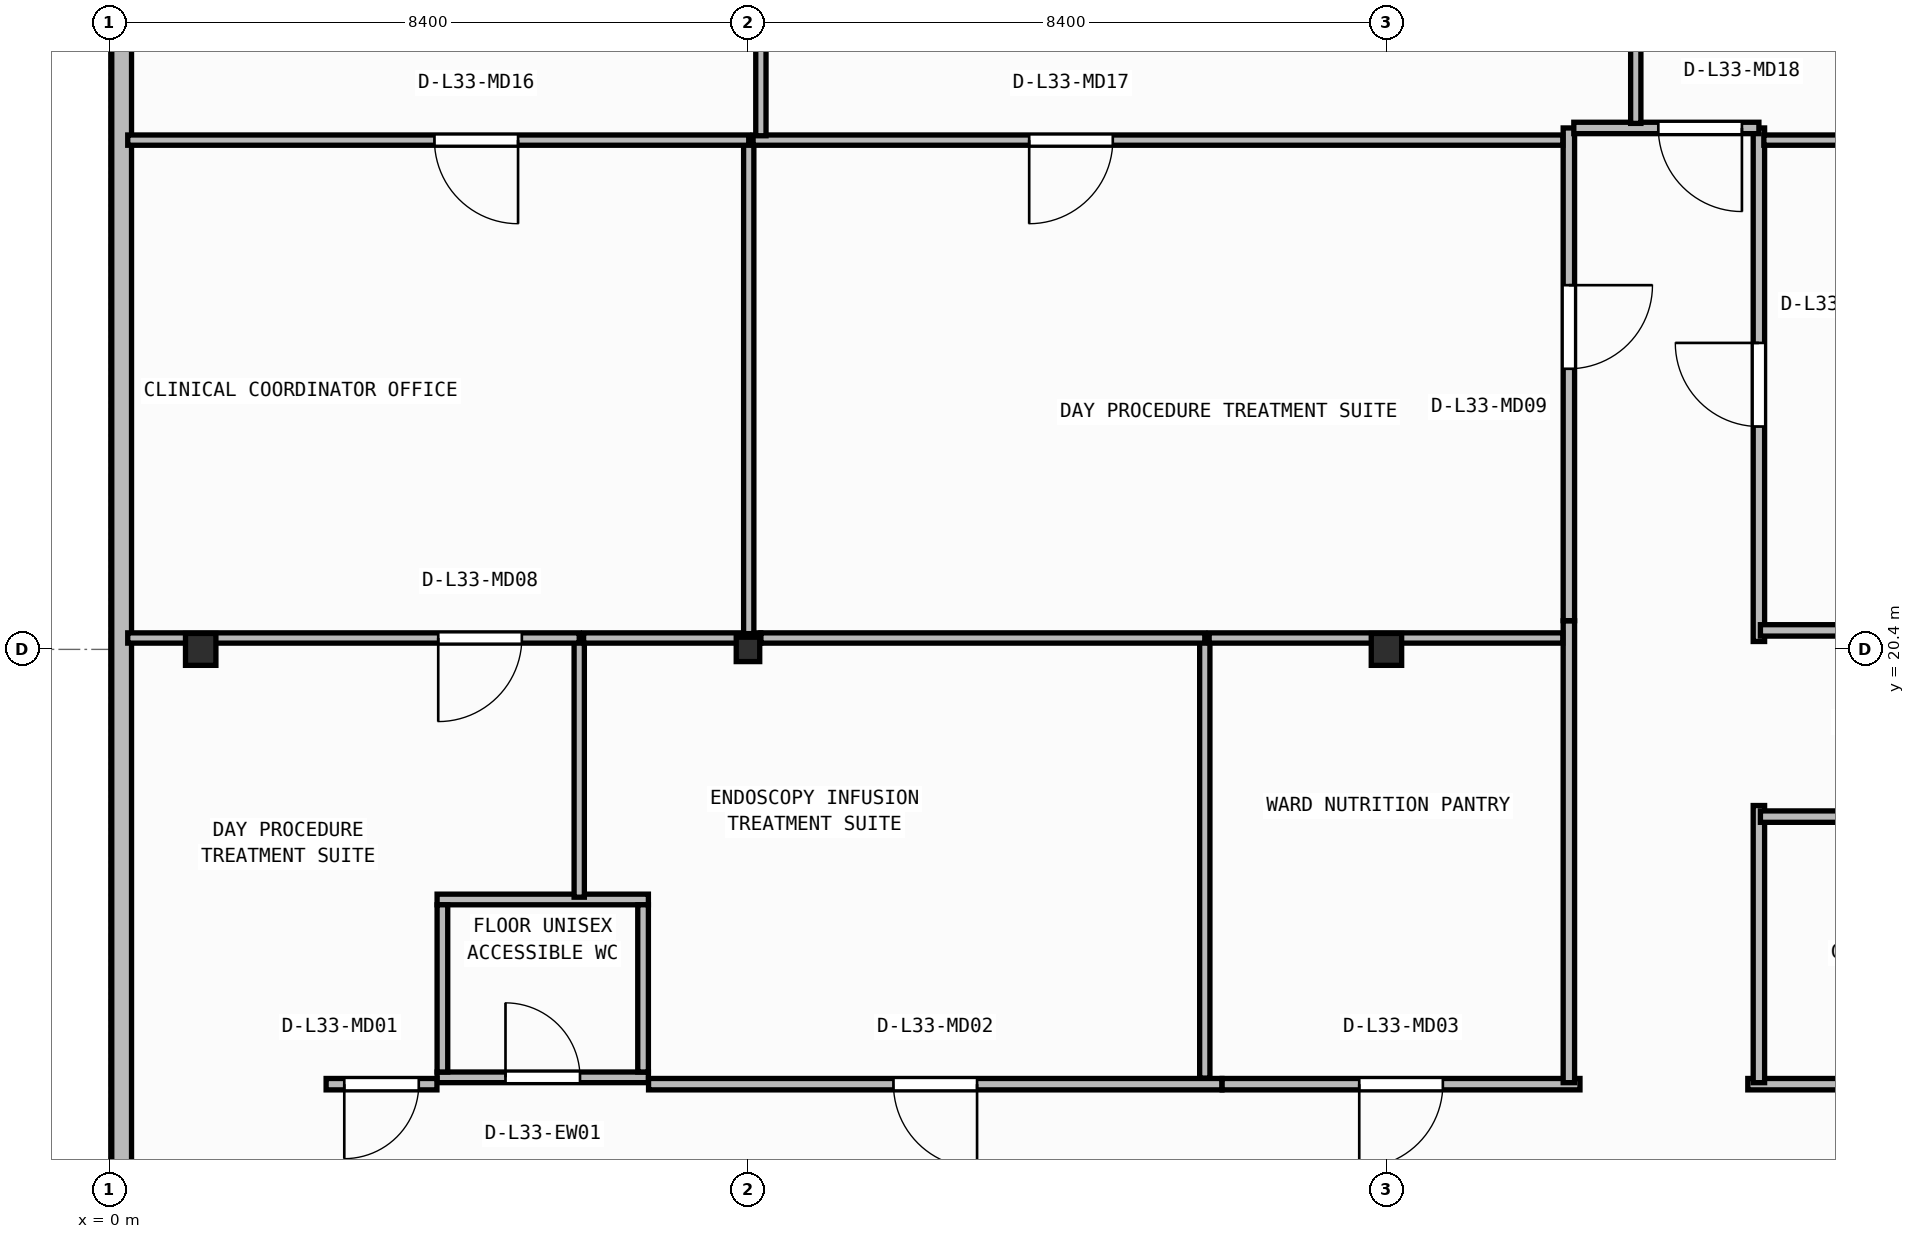
"""IFC4 building model, lengths in metres.
Left out: names, types, materials, properties, quantities, classifications, styles, units other than length and angle.
Written with IfcOpenShell. Run it as: python <this file> out.ifc"""

import sys

from ifc_helpers import new_model, si_unit, direction, frame, frame_2d, origin, origin_2d, place, context, subcontext, project, spatial, rectangle, i_section, extrude, element, fill, save


model = new_model("IFC4")
c1 = context("Model", 3, precision=1e-05, world=origin(), true_north=direction((0.0, 1.0)))
c2 = subcontext(c1, "Body", "Model", "MODEL_VIEW")
j1 = project(units=[si_unit("LENGTHUNIT", "METRE"), si_unit("PLANEANGLEUNIT", "RADIAN")], contexts=[c1])
p1 = place(None, origin())
s1 = spatial("IfcSite", under=j1, at=p1, CompositionType="ELEMENT")
p2 = place(p1, origin())
s2 = spatial("IfcBuilding", under=s1, at=p2, CompositionType="ELEMENT")
p3 = place(p2, frame((0.0, 0.0, 134.95)))
s3 = spatial("IfcBuildingStorey", under=s2, at=p3, CompositionType="ELEMENT", Elevation=134.95)
p4 = place(p3, frame((1.2, 20.4, 0.0), z_axis=(0.0, 0.0, 1.0), x_axis=(1.0, 0.0, 0.0)))
e1 = element("IfcColumn", 1, at=p4, inside=s3, PredefinedType="COLUMN", context=c2, shape_type="SweptSolid", body=[
    extrude(i_section(OverallWidth=0.4, OverallDepth=0.42, WebThickness=0.025, FlangeThickness=0.04, at=origin_2d()), origin(), (0.0, 0.0, 1.0), 3.95),
])
p5 = place(p3, frame((8.4, 20.4, 0.0), z_axis=(0.0, 0.0, 1.0), x_axis=(1.0, 0.0, 0.0)))
e2 = element("IfcColumn", 2, at=p5, inside=s3, PredefinedType="COLUMN", context=c2, shape_type="SweptSolid", body=[
    extrude(i_section(OverallWidth=0.309, OverallDepth=0.321, WebThickness=0.014, FlangeThickness=0.022, FilletRadius=0.017, at=origin_2d()), origin(), (0.0, 0.0, 1.0), 3.95),
])
p6 = place(p3, frame((16.8, 20.4, 0.0), z_axis=(0.0, 0.0, 1.0), x_axis=(1.0, 0.0, 0.0)))
e3 = element("IfcColumn", 3, at=p6, inside=s3, PredefinedType="COLUMN", context=c2, shape_type="SweptSolid", body=[
    extrude(i_section(OverallWidth=0.4, OverallDepth=0.42, WebThickness=0.025, FlangeThickness=0.04, at=origin_2d()), origin(), (0.0, 0.0, 1.0), 3.95),
])
p7 = place(p3, frame((0.16, 40.64, 0.0), z_axis=(0.0, 0.0, 1.0), x_axis=(0.0, -1.0, 0.0)))
e4 = element("IfcWall", 4, at=p7, inside=s3, PredefinedType="STANDARD", context=c2, shape_type="SweptSolid", body=[
    extrude(rectangle(XDim=37.88, YDim=0.26, at=frame_2d((18.94, 0.0))), origin(), (0.0, 0.0, 1.0), 3.71),
])
p8 = place(p7, frame((27.795, 0.0, 0.9)))
e5 = element("IfcOpeningElement", 5, at=p8, cuts=e4, PredefinedType="OPENING", context=c2, shape_type="SweptSolid", body=[
    extrude(rectangle(XDim=2.4, YDim=1.65, at=frame_2d((1.2, 0.825))), frame((0.0, 0.14, 0.0), z_axis=(0.0, -1.0, 0.0), x_axis=(1.0, 0.0, 0.0)), (0.0, 0.0, 1.0), 0.28),
])
p9 = place(p3, frame((4.31, 14.77, 0.0), z_axis=(0.0, 0.0, 1.0), x_axis=(1.0, 0.0, 0.0)))
e6 = element("IfcWall", 6, at=p9, inside=s3, PredefinedType="PARTITIONING", context=c2, shape_type="SweptSolid", body=[
    extrude(rectangle(XDim=2.78, YDim=0.14, at=frame_2d((1.39, 0.0))), origin(), (0.0, 0.0, 1.0), 3.71),
])
p10 = place(p9, frame((0.9, 0.0, 0.0)))
e7 = element("IfcOpeningElement", 7, at=p10, cuts=e6, PredefinedType="OPENING", context=c2, shape_type="SweptSolid", body=[
    extrude(rectangle(XDim=0.98, YDim=2.1, at=frame_2d((0.49, 1.05))), frame((0.0, 0.08, 0.0), z_axis=(0.0, -1.0, 0.0), x_axis=(1.0, 0.0, 0.0)), (0.0, 0.0, 1.0), 0.16),
])
p11 = place(p3, frame((4.31, 17.11, 0.0), z_axis=(0.0, 0.0, 1.0), x_axis=(1.0, 0.0, 0.0)))
e8 = element("IfcWall", 8, at=p11, inside=s3, PredefinedType="PARTITIONING", context=c2, shape_type="SweptSolid", body=[
    extrude(rectangle(XDim=2.78, YDim=0.14, at=frame_2d((1.39, 0.0))), origin(), (0.0, 0.0, 1.0), 3.71),
])
for number, where, z_axis, x_axis in (
    (9, (4.38, 14.84, 0.0), (0.0, 0.0, 1.0), (0.0, 1.0, 0.0)),
    (10, (7.02, 14.84, 0.0), (0.0, 0.0, 1.0), (0.0, 1.0, 0.0)),
):
    element("IfcWall", number, at=place(p3, frame(where, z_axis=z_axis, x_axis=x_axis)), inside=s3, PredefinedType="PARTITIONING", context=c2, shape_type="SweptSolid", body=[
        extrude(rectangle(XDim=2.2, YDim=0.14, at=frame_2d((1.1, 0.0))), origin(), (0.0, 0.0, 1.0), 3.71),
    ])
p12 = place(p3, frame((4.308, 14.68, 0.0), z_axis=(0.0, 0.0, 1.0), x_axis=(-1.0, 0.0, 0.0)))
e11 = element("IfcWall", 11, at=p12, inside=s3, PredefinedType="PARTITIONING", context=c2, shape_type="SweptSolid", body=[
    extrude(rectangle(XDim=1.458, YDim=0.15, at=frame_2d((0.729, 0.0))), origin(), (0.0, 0.0, 1.0), 3.71),
])
p13 = place(p12, frame((0.239, 0.0, 0.0)))
e12 = element("IfcOpeningElement", 12, at=p13, cuts=e11, PredefinedType="OPENING", context=c2, shape_type="SweptSolid", body=[
    extrude(rectangle(XDim=0.98, YDim=2.1, at=frame_2d((0.49, 1.05))), frame((0.0, 0.085, 0.0), z_axis=(0.0, -1.0, 0.0), x_axis=(1.0, 0.0, 0.0)), (0.0, 0.0, 1.0), 0.17),
])
p14 = place(p3, frame((14.636, 14.68, 0.0), z_axis=(0.0, 0.0, 1.0), x_axis=(-1.0, 0.0, 0.0)))
e13 = element("IfcWall", 13, at=p14, inside=s3, PredefinedType="PARTITIONING", context=c2, shape_type="SweptSolid", body=[
    extrude(rectangle(XDim=7.544, YDim=0.15, at=frame_2d((3.772, 0.0))), origin(), (0.0, 0.0, 1.0), 3.71),
])
p15 = place(p14, frame((3.222, 0.0, 0.0)))
e14 = element("IfcOpeningElement", 14, at=p15, cuts=e13, PredefinedType="OPENING", context=c2, shape_type="SweptSolid", body=[
    extrude(rectangle(XDim=1.1, YDim=2.1, at=frame_2d((0.55, 1.05))), frame((0.0, 0.085, 0.0), z_axis=(0.0, -1.0, 0.0), x_axis=(1.0, 0.0, 0.0)), (0.0, 0.0, 1.0), 0.17),
])
p16 = place(p3, frame((19.346, 14.68, 0.0), z_axis=(0.0, 0.0, 1.0), x_axis=(-1.0, 0.0, 0.0)))
e15 = element("IfcWall", 15, at=p16, inside=s3, PredefinedType="PARTITIONING", context=c2, shape_type="SweptSolid", body=[
    extrude(rectangle(XDim=4.708, YDim=0.15, at=frame_2d((2.354, 0.0))), origin(), (0.0, 0.0, 1.0), 3.71),
])
p17 = place(p16, frame((1.804, 0.0, 0.0)))
e16 = element("IfcOpeningElement", 16, at=p17, cuts=e15, PredefinedType="OPENING", context=c2, shape_type="SweptSolid", body=[
    extrude(rectangle(XDim=1.1, YDim=2.1, at=frame_2d((0.55, 1.05))), frame((0.0, 0.085, 0.0), z_axis=(0.0, -1.0, 0.0), x_axis=(1.0, 0.0, 0.0)), (0.0, 0.0, 1.0), 0.17),
])
p18 = place(p3, frame((34.196, 14.68, 0.0), z_axis=(0.0, 0.0, 1.0), x_axis=(-1.0, 0.0, 0.0)))
e17 = element("IfcWall", 17, at=p18, inside=s3, PredefinedType="PARTITIONING", context=c2, shape_type="SweptSolid", body=[
    extrude(rectangle(XDim=12.642, YDim=0.15, at=frame_2d((6.321, 0.0))), origin(), (0.0, 0.0, 1.0), 3.71),
])
p19 = place(p18, frame((5.771, 0.0, 0.0)))
e18 = element("IfcOpeningElement", 18, at=p19, cuts=e17, PredefinedType="OPENING", context=c2, shape_type="SweptSolid", body=[
    extrude(rectangle(XDim=1.1, YDim=2.1, at=frame_2d((0.55, 1.05))), frame((0.0, 0.085, 0.0), z_axis=(0.0, -1.0, 0.0), x_axis=(1.0, 0.0, 0.0)), (0.0, 0.0, 1.0), 0.17),
])
p20 = place(p3, frame((19.2, 20.776, 0.0), z_axis=(0.0, 0.0, 1.0), x_axis=(0.0, -1.0, 0.0)))
e19 = element("IfcWall", 19, at=p20, inside=s3, PredefinedType="PARTITIONING", context=c2, shape_type="SweptSolid", body=[
    extrude(rectangle(XDim=6.076, YDim=0.15, at=frame_2d((3.038, 0.0))), origin(), (0.0, 0.0, 1.0), 3.71),
])
p21 = place(p3, frame((21.7, 14.7, 0.0), z_axis=(0.0, 0.0, 1.0), x_axis=(0.0, 1.0, 0.0)))
e20 = element("IfcWall", 20, at=p21, inside=s3, PredefinedType="PARTITIONING", context=c2, shape_type="SweptSolid", body=[
    extrude(rectangle(XDim=3.646, YDim=0.15, at=frame_2d((1.823, 0.0))), origin(), (0.0, 0.0, 1.0), 3.71),
])
p22 = place(p3, frame((19.2, 27.26, 0.0), z_axis=(0.0, 0.0, 1.0), x_axis=(0.0, -1.0, 0.0)))
e21 = element("IfcWall", 21, at=p22, inside=s3, PredefinedType="PARTITIONING", context=c2, shape_type="SweptSolid", body=[
    extrude(rectangle(XDim=6.482, YDim=0.15, at=frame_2d((3.241, 0.0))), origin(), (0.0, 0.0, 1.0), 3.71),
])
p23 = place(p22, frame((2.068, 0.0, 0.0)))
e22 = element("IfcOpeningElement", 22, at=p23, cuts=e21, PredefinedType="OPENING", context=c2, shape_type="SweptSolid", body=[
    extrude(rectangle(XDim=1.1, YDim=2.1, at=frame_2d((0.55, 1.05))), frame((0.0, 0.085, 0.0), z_axis=(0.0, -1.0, 0.0), x_axis=(1.0, 0.0, 0.0)), (0.0, 0.0, 1.0), 0.17),
])
p24 = place(p3, frame((21.7, 20.504, 0.0), z_axis=(0.0, 0.0, 1.0), x_axis=(0.0, 1.0, 0.0)))
e23 = element("IfcWall", 23, at=p24, inside=s3, PredefinedType="PARTITIONING", context=c2, shape_type="SweptSolid", body=[
    extrude(rectangle(XDim=6.756, YDim=0.15, at=frame_2d((3.378, 0.0))), origin(), (0.0, 0.0, 1.0), 3.71),
])
p25 = place(p24, frame((2.828, 0.0, 0.0)))
e24 = element("IfcOpeningElement", 24, at=p25, cuts=e23, PredefinedType="OPENING", context=c2, shape_type="SweptSolid", body=[
    extrude(rectangle(XDim=1.1, YDim=2.1, at=frame_2d((0.55, 1.05))), frame((0.0, 0.085, 0.0), z_axis=(0.0, -1.0, 0.0), x_axis=(1.0, 0.0, 0.0)), (0.0, 0.0, 1.0), 0.17),
])
p26 = place(p3, frame((21.7, 27.26, 0.0), z_axis=(0.0, 0.0, 1.0), x_axis=(-1.0, 0.0, 0.0)))
e25 = element("IfcWall", 25, at=p26, inside=s3, PredefinedType="PARTITIONING", context=c2, shape_type="SweptSolid", body=[
    extrude(rectangle(XDim=2.435, YDim=0.15, at=frame_2d((1.218, 0.0))), origin(), (0.0, 0.0, 1.0), 3.71),
])
p27 = place(p26, frame((0.223, 0.0, 0.0)))
e26 = element("IfcOpeningElement", 26, at=p27, cuts=e25, PredefinedType="OPENING", context=c2, shape_type="SweptSolid", body=[
    extrude(rectangle(XDim=1.1, YDim=2.1, at=frame_2d((0.55, 1.05))), frame((0.0, 0.085, 0.0), z_axis=(0.0, -1.0, 0.0), x_axis=(1.0, 0.0, 0.0)), (0.0, 0.0, 1.0), 0.17),
])
p28 = place(p3, frame((21.72, 18.2, 0.0), z_axis=(0.0, 0.0, 1.0), x_axis=(1.0, 0.0, 0.0)))
e27 = element("IfcWall", 27, at=p28, inside=s3, PredefinedType="PARTITIONING", context=c2, shape_type="SweptSolid", body=[
    extrude(rectangle(XDim=12.476, YDim=0.15, at=frame_2d((6.238, 0.0))), origin(), (0.0, 0.0, 1.0), 3.71),
])
p29 = place(p3, frame((27.256, 20.65, 0.0), z_axis=(0.0, 0.0, 1.0), x_axis=(-1.0, 0.0, 0.0)))
e28 = element("IfcWall", 28, at=p29, inside=s3, PredefinedType="PARTITIONING", context=c2, shape_type="SweptSolid", body=[
    extrude(rectangle(XDim=5.536, YDim=0.15, at=frame_2d((2.768, 0.0))), origin(), (0.0, 0.0, 1.0), 3.083),
])
p30 = place(p3, frame((6.18, 17.14, 0.0), z_axis=(0.0, 0.0, 1.0), x_axis=(0.0, 1.0, 0.0)))
e29 = element("IfcWall", 29, at=p30, inside=s3, PredefinedType="PARTITIONING", context=c2, shape_type="SweptSolid", body=[
    extrude(rectangle(XDim=3.41, YDim=0.135, at=frame_2d((1.705, 0.0))), origin(), (0.0, 0.0, 1.0), 3.71),
])
p31 = place(p3, frame((6.18, 20.55, 0.0), z_axis=(0.0, 0.0, 1.0), x_axis=(-1.0, 0.0, 0.0)))
e30 = element("IfcWall", 30, at=p31, inside=s3, PredefinedType="PARTITIONING", context=c2, shape_type="SweptSolid", body=[
    extrude(rectangle(XDim=5.94, YDim=0.135, at=frame_2d((2.97, 0.0))), origin(), (0.0, 0.0, 1.0), 3.083),
])
p32 = place(p31, frame((0.755, 0.0, 0.0)))
e31 = element("IfcOpeningElement", 31, at=p32, cuts=e30, PredefinedType="OPENING", context=c2, shape_type="SweptSolid", body=[
    extrude(rectangle(XDim=1.1, YDim=2.1, at=frame_2d((0.55, 1.05))), frame((0.0, 0.077, 0.0), z_axis=(0.0, -1.0, 0.0), x_axis=(1.0, 0.0, 0.0)), (0.0, 0.0, 1.0), 0.155),
])
p33 = place(p3, frame((14.41, 14.76, 0.0), z_axis=(0.0, 0.0, 1.0), x_axis=(0.0, 1.0, 0.0)))
e32 = element("IfcWall", 32, at=p33, inside=s3, PredefinedType="PARTITIONING", context=c2, shape_type="SweptSolid", body=[
    extrude(rectangle(XDim=5.79, YDim=0.135, at=frame_2d((2.895, 0.0))), origin(), (0.0, 0.0, 1.0), 3.71),
])
p34 = place(p3, frame((8.568, 20.55, 0.0), z_axis=(0.0, 0.0, 1.0), x_axis=(-1.0, 0.0, 0.0)))
e33 = element("IfcWall", 33, at=p34, inside=s3, PredefinedType="PARTITIONING", context=c2, shape_type="SweptSolid", body=[
    extrude(rectangle(XDim=2.331, YDim=0.135, at=frame_2d((1.166, 0.0))), origin(), (0.0, 0.0, 1.0), 3.083),
])
p35 = place(p3, frame((14.41, 20.55, 0.0), z_axis=(0.0, 0.0, 1.0), x_axis=(-1.0, 0.0, 0.0)))
e34 = element("IfcWall", 34, at=p35, inside=s3, PredefinedType="PARTITIONING", context=c2, shape_type="SweptSolid", body=[
    extrude(rectangle(XDim=5.84, YDim=0.135, at=frame_2d((2.92, 0.0))), origin(), (0.0, 0.0, 1.0), 3.083),
])
p36 = place(p3, frame((19.12, 20.55, 0.0), z_axis=(0.0, 0.0, 1.0), x_axis=(-1.0, 0.0, 0.0)))
e35 = element("IfcWall", 35, at=p36, inside=s3, PredefinedType="PARTITIONING", context=c2, shape_type="SweptSolid", body=[
    extrude(rectangle(XDim=4.653, YDim=0.135, at=frame_2d((2.326, 0.0))), origin(), (0.0, 0.0, 1.0), 3.083),
])
p37 = place(p3, frame((8.41, 20.607, 0.0), z_axis=(0.0, 0.0, 1.0), x_axis=(0.0, 1.0, 0.0)))
e36 = element("IfcWall", 36, at=p37, inside=s3, PredefinedType="PARTITIONING", context=c2, shape_type="SweptSolid", body=[
    extrude(rectangle(XDim=6.493, YDim=0.135, at=frame_2d((3.246, 0.0))), origin(), (0.0, 0.0, 1.0), 3.152),
])
p38 = place(p3, frame((8.41, 27.1, 0.0), z_axis=(0.0, 0.0, 1.0), x_axis=(-1.0, 0.0, 0.0)))
e37 = element("IfcWall", 37, at=p38, inside=s3, PredefinedType="PARTITIONING", context=c2, shape_type="SweptSolid", body=[
    extrude(rectangle(XDim=8.17, YDim=0.135, at=frame_2d((4.085, 0.0))), origin(), (0.0, 0.0, 1.0), 3.71),
])
p39 = place(p38, frame((3.035, 0.0, 0.0)))
e38 = element("IfcOpeningElement", 38, at=p39, cuts=e37, PredefinedType="OPENING", context=c2, shape_type="SweptSolid", body=[
    extrude(rectangle(XDim=1.1, YDim=2.1, at=frame_2d((0.55, 1.05))), frame((0.0, 0.077, 0.0), z_axis=(0.0, -1.0, 0.0), x_axis=(1.0, 0.0, 0.0)), (0.0, 0.0, 1.0), 0.155),
])
p40 = place(p3, frame((19.12, 27.1, 0.0), z_axis=(0.0, 0.0, 1.0), x_axis=(-1.0, 0.0, 0.0)))
e39 = element("IfcWall", 39, at=p40, inside=s3, PredefinedType="PARTITIONING", context=c2, shape_type="SweptSolid", body=[
    extrude(rectangle(XDim=10.653, YDim=0.135, at=frame_2d((5.326, 0.0))), origin(), (0.0, 0.0, 1.0), 3.71),
])
p41 = place(p40, frame((5.92, 0.0, 0.0)))
e40 = element("IfcOpeningElement", 40, at=p41, cuts=e39, PredefinedType="OPENING", context=c2, shape_type="SweptSolid", body=[
    extrude(rectangle(XDim=1.1, YDim=2.1, at=frame_2d((0.55, 1.05))), frame((0.0, 0.077, 0.0), z_axis=(0.0, -1.0, 0.0), x_axis=(1.0, 0.0, 0.0)), (0.0, 0.0, 1.0), 0.155),
])
p42 = place(p3, frame((27.03, 27.1, 0.0), z_axis=(0.0, 0.0, 1.0), x_axis=(-1.0, 0.0, 0.0)))
e41 = element("IfcWall", 41, at=p42, inside=s3, PredefinedType="PARTITIONING", context=c2, shape_type="SweptSolid", body=[
    extrude(rectangle(XDim=5.265, YDim=0.135, at=frame_2d((2.633, 0.0))), origin(), (0.0, 0.0, 1.0), 3.71),
])
p43 = place(p3, frame((8.57, 27.157, 0.0), z_axis=(0.0, 0.0, 1.0), x_axis=(0.0, 1.0, 0.0)))
e42 = element("IfcWall", 42, at=p43, inside=s3, PredefinedType="PARTITIONING", context=c2, shape_type="SweptSolid", body=[
    extrude(rectangle(XDim=12.095, YDim=0.135, at=frame_2d((6.048, 0.0))), origin(), (0.0, 0.0, 1.0), 3.152),
])
p44 = place(p3, frame((20.08, 27.32, 0.0), z_axis=(0.0, 0.0, 1.0), x_axis=(0.0, 1.0, 0.0)))
e43 = element("IfcWall", 43, at=p44, inside=s3, PredefinedType="PARTITIONING", context=c2, shape_type="SweptSolid", body=[
    extrude(rectangle(XDim=6.107, YDim=0.135, at=frame_2d((3.053, 0.0))), origin(), (0.0, 0.0, 1.0), 3.71),
])
p45 = place(p10, origin())
e44 = element("IfcDoor", 44, at=p45, inside=s3, OperationType="SINGLE_SWING_LEFT", PredefinedType="DOOR", context=c2, shape_type="SweptSolid", body=[
    extrude(rectangle(XDim=0.98, YDim=2.1, at=frame_2d((0.49, 1.05))), frame((0.0, 0.025, 0.0), z_axis=(0.0, -1.0, 0.0), x_axis=(1.0, 0.0, 0.0)), (0.0, 0.0, 1.0), 0.05),
])
fill(e7, e44)
p46 = place(p13, origin())
e45 = element("IfcDoor", 45, at=p46, inside=s3, OperationType="SINGLE_SWING_RIGHT", PredefinedType="DOOR", context=c2, shape_type="SweptSolid", body=[
    extrude(rectangle(XDim=0.98, YDim=2.1, at=frame_2d((0.49, 1.05))), frame((0.0, 0.025, 0.0), z_axis=(0.0, -1.0, 0.0), x_axis=(1.0, 0.0, 0.0)), (0.0, 0.0, 1.0), 0.05),
])
fill(e12, e45)
p47 = place(p15, origin())
e46 = element("IfcDoor", 46, at=p47, inside=s3, OperationType="SINGLE_SWING_LEFT", PredefinedType="DOOR", context=c2, shape_type="SweptSolid", body=[
    extrude(rectangle(XDim=1.1, YDim=2.1, at=frame_2d((0.55, 1.05))), frame((0.0, 0.025, 0.0), z_axis=(0.0, -1.0, 0.0), x_axis=(1.0, 0.0, 0.0)), (0.0, 0.0, 1.0), 0.05),
])
fill(e14, e46)
p48 = place(p17, origin())
e47 = element("IfcDoor", 47, at=p48, inside=s3, OperationType="SINGLE_SWING_RIGHT", PredefinedType="DOOR", context=c2, shape_type="SweptSolid", body=[
    extrude(rectangle(XDim=1.1, YDim=2.1, at=frame_2d((0.55, 1.05))), frame((0.0, 0.025, 0.0), z_axis=(0.0, -1.0, 0.0), x_axis=(1.0, 0.0, 0.0)), (0.0, 0.0, 1.0), 0.05),
])
fill(e16, e47)
p49 = place(p23, origin())
e48 = element("IfcDoor", 48, at=p49, inside=s3, OperationType="SINGLE_SWING_LEFT", PredefinedType="DOOR", context=c2, shape_type="SweptSolid", body=[
    extrude(rectangle(XDim=1.1, YDim=2.1, at=frame_2d((0.55, 1.05))), frame((0.0, 0.025, 0.0), z_axis=(0.0, -1.0, 0.0), x_axis=(1.0, 0.0, 0.0)), (0.0, 0.0, 1.0), 0.05),
])
fill(e22, e48)
p50 = place(p25, origin())
e49 = element("IfcDoor", 49, at=p50, inside=s3, OperationType="SINGLE_SWING_RIGHT", PredefinedType="DOOR", context=c2, shape_type="SweptSolid", body=[
    extrude(rectangle(XDim=1.1, YDim=2.1, at=frame_2d((0.55, 1.05))), frame((0.0, 0.025, 0.0), z_axis=(0.0, -1.0, 0.0), x_axis=(1.0, 0.0, 0.0)), (0.0, 0.0, 1.0), 0.05),
])
fill(e24, e49)
p51 = place(p27, origin())
e50 = element("IfcDoor", 50, at=p51, inside=s3, OperationType="SINGLE_SWING_LEFT", PredefinedType="DOOR", context=c2, shape_type="SweptSolid", body=[
    extrude(rectangle(XDim=1.1, YDim=2.1, at=frame_2d((0.55, 1.05))), frame((0.0, 0.025, 0.0), z_axis=(0.0, -1.0, 0.0), x_axis=(1.0, 0.0, 0.0)), (0.0, 0.0, 1.0), 0.05),
])
fill(e26, e50)
p52 = place(p32, origin())
e51 = element("IfcDoor", 51, at=p52, inside=s3, OperationType="SINGLE_SWING_RIGHT", PredefinedType="DOOR", context=c2, shape_type="SweptSolid", body=[
    extrude(rectangle(XDim=1.1, YDim=2.1, at=frame_2d((0.55, 1.05))), frame((0.0, 0.025, 0.0), z_axis=(0.0, -1.0, 0.0), x_axis=(1.0, 0.0, 0.0)), (0.0, 0.0, 1.0), 0.05),
])
fill(e31, e51)
p53 = place(p39, origin())
e52 = element("IfcDoor", 52, at=p53, inside=s3, OperationType="SINGLE_SWING_LEFT", PredefinedType="DOOR", context=c2, shape_type="SweptSolid", body=[
    extrude(rectangle(XDim=1.1, YDim=2.1, at=frame_2d((0.55, 1.05))), frame((0.0, 0.025, 0.0), z_axis=(0.0, -1.0, 0.0), x_axis=(1.0, 0.0, 0.0)), (0.0, 0.0, 1.0), 0.05),
])
fill(e38, e52)
p54 = place(p41, origin())
e53 = element("IfcDoor", 53, at=p54, inside=s3, OperationType="SINGLE_SWING_RIGHT", PredefinedType="DOOR", context=c2, shape_type="SweptSolid", body=[
    extrude(rectangle(XDim=1.1, YDim=2.1, at=frame_2d((0.55, 1.05))), frame((0.0, 0.025, 0.0), z_axis=(0.0, -1.0, 0.0), x_axis=(1.0, 0.0, 0.0)), (0.0, 0.0, 1.0), 0.05),
])
fill(e40, e53)
save(model, sys.argv[1])
